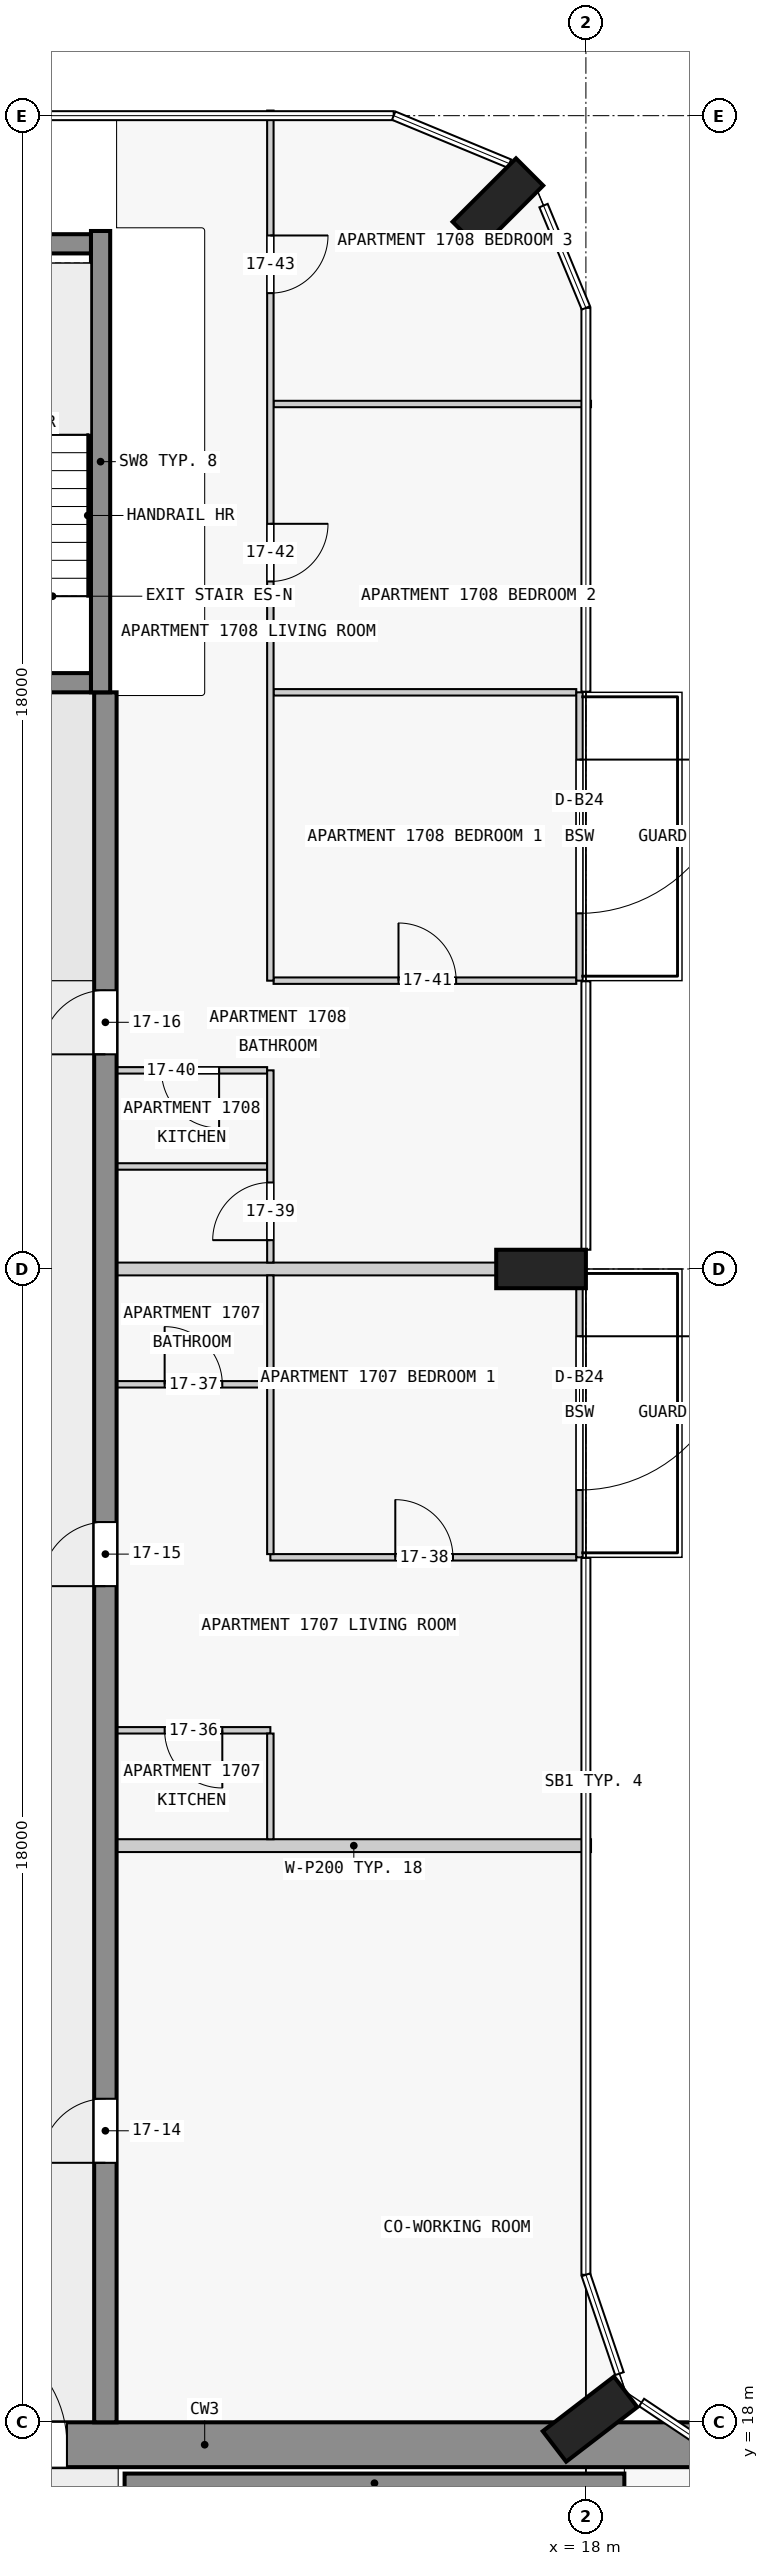
"""IFC4 building model, lengths in metres.
Left out: names, types, materials, properties, quantities, classifications, styles, units other than length and angle.
Written with IfcOpenShell. Run it as: python <this file> out.ifc"""

import sys

from ifc_helpers import new_model, si_unit, direction, frame, frame_2d, origin, origin_2d, place, context, subcontext, project, spatial, rectangle, extrude, element, fill, save


model = new_model("IFC4")
c1 = context("Model", 3, precision=1e-05, world=origin(), true_north=direction((0.0, 1.0)))
c2 = subcontext(c1, "Body", "Model", "MODEL_VIEW")
j1 = project(units=[si_unit("LENGTHUNIT", "METRE"), si_unit("PLANEANGLEUNIT", "RADIAN")], contexts=[c1])
p1 = place(None, origin())
s1 = spatial("IfcSite", under=j1, at=p1, CompositionType="ELEMENT")
p2 = place(p1, origin())
s2 = spatial("IfcBuilding", under=s1, at=p2, CompositionType="ELEMENT")
p3 = place(p2, frame((0.0, 0.0, 68.8)))
s3 = spatial("IfcBuildingStorey", under=s2, at=p3, CompositionType="ELEMENT", Elevation=68.8)
for number, where, z_axis, x_axis in (
    (1, (18.065, 18.05, 0.0), (0.0, 0.0, 1.0), (-0.609, 0.793, 0.0)),
    (2, (17.3, 36.0, 0.0), (0.0, 0.0, 1.0), (0.0, 1.0, 0.0)),
    (3, (16.626, 52.626, 0.0), (0.0, 0.0, 1.0), (-0.707, 0.707, 0.0)),
):
    element("IfcColumn", number, at=place(p3, frame(where, z_axis=z_axis, x_axis=x_axis)), inside=s3, PredefinedType="COLUMN", context=c2, shape_type="SweptSolid", body=[
        extrude(rectangle(XDim=0.6, YDim=1.4, at=origin_2d()), origin(), (0.0, 0.0, 1.0), 3.5),
    ])
p4 = place(p3, frame((1.6, 17.65, 0.0), z_axis=(0.0, 0.0, 1.0), x_axis=(1.0, 0.0, 0.0)))
e4 = element("IfcWall", 4, at=p4, inside=s3, PredefinedType="SHEAR", context=c2, shape_type="SweptSolid", body=[
    extrude(rectangle(XDim=20.9, YDim=0.7, at=frame_2d((10.45, 0.0))), origin(), (0.0, 0.0, 1.0), 3.2),
])
p5 = place(p4, frame((6.5, 0.0, 0.0)))
e5 = element("IfcOpeningElement", 5, at=p5, cuts=e4, PredefinedType="OPENING", context=c2, shape_type="SweptSolid", body=[
    extrude(rectangle(XDim=1.8, YDim=2.1, at=frame_2d((0.9, 1.05))), frame((0.0, 0.36, 0.0), z_axis=(0.0, -1.0, 0.0), x_axis=(1.0, 0.0, 0.0)), (0.0, 0.0, 1.0), 0.72),
])
p6 = place(p3, frame((10.8, 17.05, 0.0), z_axis=(0.0, 0.0, 1.0), x_axis=(1.0, 0.0, 0.0)))
e6 = element("IfcWall", 6, at=p6, inside=s3, PredefinedType="SHEAR", context=c2, shape_type="SweptSolid", body=[
    extrude(rectangle(XDim=7.8, YDim=0.3, at=frame_2d((3.9, 0.0))), origin(), (0.0, 0.0, 1.0), 3.2),
])
p7 = place(p3, frame((7.725, 45.15, 0.0), z_axis=(0.0, 0.0, 1.0), x_axis=(1.0, 0.0, 0.0)))
e7 = element("IfcWall", 7, at=p7, inside=s3, PredefinedType="SHEAR", context=c2, shape_type="SweptSolid", body=[
    extrude(rectangle(XDim=2.55, YDim=0.3, at=frame_2d((1.275, 0.0))), origin(), (0.0, 0.0, 1.0), 3.5),
])
p8 = place(p7, frame((0.725, 0.0, 0.0)))
e8 = element("IfcOpeningElement", 8, at=p8, cuts=e7, PredefinedType="OPENING", context=c2, shape_type="SweptSolid", body=[
    extrude(rectangle(XDim=1.1, YDim=2.1, at=frame_2d((0.55, 1.05))), frame((0.0, 0.16, 0.0), z_axis=(0.0, -1.0, 0.0), x_axis=(1.0, 0.0, 0.0)), (0.0, 0.0, 1.0), 0.32),
])
p9 = place(p3, frame((7.725, 52.0, 0.0), z_axis=(0.0, 0.0, 1.0), x_axis=(1.0, 0.0, 0.0)))
e9 = element("IfcWall", 9, at=p9, inside=s3, PredefinedType="SHEAR", context=c2, shape_type="SweptSolid", body=[
    extrude(rectangle(XDim=2.55, YDim=0.3, at=frame_2d((1.275, 0.0))), origin(), (0.0, 0.0, 1.0), 3.5),
])
p10 = place(p3, frame((10.425, 45.0, 0.0), z_axis=(0.0, 0.0, 1.0), x_axis=(0.0, 1.0, 0.0)))
e10 = element("IfcWall", 10, at=p10, inside=s3, PredefinedType="SHEAR", context=c2, shape_type="SweptSolid", body=[
    extrude(rectangle(XDim=7.2, YDim=0.3, at=frame_2d((3.6, 0.0))), origin(), (0.0, 0.0, 1.0), 3.5),
])
p11 = place(p3, frame((10.5, 18.0, 0.0), z_axis=(0.0, 0.0, 1.0), x_axis=(0.0, 1.0, 0.0)))
e11 = element("IfcWall", 11, at=p11, inside=s3, PredefinedType="SHEAR", context=c2, shape_type="SweptSolid", body=[
    extrude(rectangle(XDim=27.0, YDim=0.35, at=frame_2d((13.5, 0.0))), origin(), (0.0, 0.0, 1.0), 3.2),
])
p12 = place(p11, frame((4.05, 0.0, 0.0)))
e12 = element("IfcOpeningElement", 12, at=p12, cuts=e11, PredefinedType="OPENING", context=c2, shape_type="SweptSolid", body=[
    extrude(rectangle(XDim=1.0, YDim=2.1, at=frame_2d((0.5, 1.05))), frame((0.0, 0.185, 0.0), z_axis=(0.0, -1.0, 0.0), x_axis=(1.0, 0.0, 0.0)), (0.0, 0.0, 1.0), 0.37),
])
p13 = place(p11, frame((13.05, 0.0, 0.0)))
e13 = element("IfcOpeningElement", 13, at=p13, cuts=e11, PredefinedType="OPENING", context=c2, shape_type="SweptSolid", body=[
    extrude(rectangle(XDim=1.0, YDim=2.1, at=frame_2d((0.5, 1.05))), frame((0.0, 0.185, 0.0), z_axis=(0.0, -1.0, 0.0), x_axis=(1.0, 0.0, 0.0)), (0.0, 0.0, 1.0), 0.37),
])
p14 = place(p11, frame((21.35, 0.0, 0.0)))
e14 = element("IfcOpeningElement", 14, at=p14, cuts=e11, PredefinedType="OPENING", context=c2, shape_type="SweptSolid", body=[
    extrude(rectangle(XDim=1.0, YDim=2.1, at=frame_2d((0.5, 1.05))), frame((0.0, 0.185, 0.0), z_axis=(0.0, -1.0, 0.0), x_axis=(1.0, 0.0, 0.0)), (0.0, 0.0, 1.0), 0.37),
])
p15 = place(p3, frame((17.9, 36.0, 0.0), z_axis=(0.0, 0.0, 1.0), x_axis=(0.0, -1.0, 0.0)))
e15 = element("IfcWall", 15, at=p15, inside=s3, PredefinedType="STANDARD", context=c2, shape_type="SweptSolid", body=[
    extrude(rectangle(XDim=4.5, YDim=0.1, at=frame_2d((2.25, 0.0))), origin(), (0.0, 0.0, 1.0), 3.2),
])
p16 = place(p15, frame((1.05, 0.0, 0.0)))
e16 = element("IfcOpeningElement", 16, at=p16, cuts=e15, PredefinedType="OPENING", context=c2, shape_type="SweptSolid", body=[
    extrude(rectangle(XDim=2.4, YDim=2.4, at=frame_2d((1.2, 1.2))), frame((0.0, 0.06, 0.0), z_axis=(0.0, -1.0, 0.0), x_axis=(1.0, 0.0, 0.0)), (0.0, 0.0, 1.0), 0.12),
])
p17 = place(p3, frame((17.9, 45.0, 0.0), z_axis=(0.0, 0.0, 1.0), x_axis=(0.0, -1.0, 0.0)))
e17 = element("IfcWall", 17, at=p17, inside=s3, PredefinedType="STANDARD", context=c2, shape_type="SweptSolid", body=[
    extrude(rectangle(XDim=4.5, YDim=0.1, at=frame_2d((2.25, 0.0))), origin(), (0.0, 0.0, 1.0), 3.2),
])
p18 = place(p17, frame((1.05, 0.0, 0.0)))
e18 = element("IfcOpeningElement", 18, at=p18, cuts=e17, PredefinedType="OPENING", context=c2, shape_type="SweptSolid", body=[
    extrude(rectangle(XDim=2.4, YDim=2.4, at=frame_2d((1.2, 1.2))), frame((0.0, 0.06, 0.0), z_axis=(0.0, -1.0, 0.0), x_axis=(1.0, 0.0, 0.0)), (0.0, 0.0, 1.0), 0.12),
])
p19 = place(p3, frame((18.08, 27.0, 0.0), z_axis=(0.0, 0.0, 1.0), x_axis=(-1.0, 0.0, 0.0)))
e19 = element("IfcWall", 19, at=p19, inside=s3, PredefinedType="PARTITIONING", context=c2, shape_type="SweptSolid", body=[
    extrude(rectangle(XDim=7.405, YDim=0.2, at=frame_2d((3.703, 0.0))), origin(), (0.0, 0.0, 1.0), 3.2),
])
p20 = place(p3, frame((13.075, 28.8, 0.0), z_axis=(0.0, 0.0, 1.0), x_axis=(-1.0, 0.0, 0.0)))
e20 = element("IfcWall", 20, at=p20, inside=s3, PredefinedType="PARTITIONING", context=c2, shape_type="SweptSolid", body=[
    extrude(rectangle(XDim=2.4, YDim=0.1, at=frame_2d((1.2, 0.0))), origin(), (0.0, 0.0, 1.0), 3.2),
])
p21 = place(p20, frame((0.75, 0.0, 0.0)))
e21 = element("IfcOpeningElement", 21, at=p21, cuts=e20, PredefinedType="OPENING", context=c2, shape_type="SweptSolid", body=[
    extrude(rectangle(XDim=0.9, YDim=2.1, at=frame_2d((0.45, 1.05))), frame((0.0, 0.06, 0.0), z_axis=(0.0, -1.0, 0.0), x_axis=(1.0, 0.0, 0.0)), (0.0, 0.0, 1.0), 0.12),
])
p22 = place(p3, frame((13.075, 31.5, 0.0), z_axis=(0.0, 0.0, 1.0), x_axis=(1.0, 0.0, 0.0)))
e22 = element("IfcWall", 22, at=p22, inside=s3, PredefinedType="PARTITIONING", context=c2, shape_type="SweptSolid", body=[
    extrude(rectangle(XDim=4.775, YDim=0.1, at=frame_2d((2.388, 0.0))), origin(), (0.0, 0.0, 1.0), 3.2),
])
p23 = place(p22, frame((1.95, 0.0, 0.0)))
e23 = element("IfcOpeningElement", 23, at=p23, cuts=e22, PredefinedType="OPENING", context=c2, shape_type="SweptSolid", body=[
    extrude(rectangle(XDim=0.9, YDim=2.1, at=frame_2d((0.45, 1.05))), frame((0.0, 0.06, 0.0), z_axis=(0.0, -1.0, 0.0), x_axis=(1.0, 0.0, 0.0)), (0.0, 0.0, 1.0), 0.12),
])
p24 = place(p3, frame((10.675, 34.2, 0.0), z_axis=(0.0, 0.0, 1.0), x_axis=(1.0, 0.0, 0.0)))
e24 = element("IfcWall", 24, at=p24, inside=s3, PredefinedType="PARTITIONING", context=c2, shape_type="SweptSolid", body=[
    extrude(rectangle(XDim=2.35, YDim=0.1, at=frame_2d((1.175, 0.0))), origin(), (0.0, 0.0, 1.0), 3.2),
])
p25 = place(p24, frame((0.75, 0.0, 0.0)))
e25 = element("IfcOpeningElement", 25, at=p25, cuts=e24, PredefinedType="OPENING", context=c2, shape_type="SweptSolid", body=[
    extrude(rectangle(XDim=0.9, YDim=2.1, at=frame_2d((0.45, 1.05))), frame((0.0, 0.06, 0.0), z_axis=(0.0, -1.0, 0.0), x_axis=(1.0, 0.0, 0.0)), (0.0, 0.0, 1.0), 0.12),
])
p26 = place(p3, frame((16.6, 36.0, 0.0), z_axis=(0.0, 0.0, 1.0), x_axis=(-1.0, 0.0, 0.0)))
e26 = element("IfcWall", 26, at=p26, inside=s3, PredefinedType="PARTITIONING", context=c2, shape_type="SweptSolid", body=[
    extrude(rectangle(XDim=5.925, YDim=0.2, at=frame_2d((2.962, 0.0))), origin(), (0.0, 0.0, 1.0), 3.2),
])
p27 = place(p3, frame((13.025, 37.6, 0.0), z_axis=(0.0, 0.0, 1.0), x_axis=(-1.0, 0.0, 0.0)))
e27 = element("IfcWall", 27, at=p27, inside=s3, PredefinedType="PARTITIONING", context=c2, shape_type="SweptSolid", body=[
    extrude(rectangle(XDim=2.35, YDim=0.1, at=frame_2d((1.175, 0.0))), origin(), (0.0, 0.0, 1.0), 3.2),
])
p28 = place(p3, frame((13.025, 39.1, 0.0), z_axis=(0.0, 0.0, 1.0), x_axis=(-1.0, 0.0, 0.0)))
e28 = element("IfcWall", 28, at=p28, inside=s3, PredefinedType="PARTITIONING", context=c2, shape_type="SweptSolid", body=[
    extrude(rectangle(XDim=2.35, YDim=0.1, at=frame_2d((1.175, 0.0))), origin(), (0.0, 0.0, 1.0), 3.2),
])
p29 = place(p28, frame((0.75, 0.0, 0.0)))
e29 = element("IfcOpeningElement", 29, at=p29, cuts=e28, PredefinedType="OPENING", context=c2, shape_type="SweptSolid", body=[
    extrude(rectangle(XDim=0.9, YDim=2.1, at=frame_2d((0.45, 1.05))), frame((0.0, 0.06, 0.0), z_axis=(0.0, -1.0, 0.0), x_axis=(1.0, 0.0, 0.0)), (0.0, 0.0, 1.0), 0.12),
])
p30 = place(p3, frame((13.125, 40.5, 0.0), z_axis=(0.0, 0.0, 1.0), x_axis=(1.0, 0.0, 0.0)))
e30 = element("IfcWall", 30, at=p30, inside=s3, PredefinedType="PARTITIONING", context=c2, shape_type="SweptSolid", body=[
    extrude(rectangle(XDim=4.725, YDim=0.1, at=frame_2d((2.363, 0.0))), origin(), (0.0, 0.0, 1.0), 3.2),
])
p31 = place(p30, frame((1.95, 0.0, 0.0)))
e31 = element("IfcOpeningElement", 31, at=p31, cuts=e30, PredefinedType="OPENING", context=c2, shape_type="SweptSolid", body=[
    extrude(rectangle(XDim=0.9, YDim=2.1, at=frame_2d((0.45, 1.05))), frame((0.0, 0.06, 0.0), z_axis=(0.0, -1.0, 0.0), x_axis=(1.0, 0.0, 0.0)), (0.0, 0.0, 1.0), 0.12),
])
p32 = place(p3, frame((17.85, 45.0, 0.0), z_axis=(0.0, 0.0, 1.0), x_axis=(-1.0, 0.0, 0.0)))
e32 = element("IfcWall", 32, at=p32, inside=s3, PredefinedType="PARTITIONING", context=c2, shape_type="SweptSolid", body=[
    extrude(rectangle(XDim=4.725, YDim=0.1, at=frame_2d((2.363, 0.0))), origin(), (0.0, 0.0, 1.0), 3.2),
])
p33 = place(p3, frame((18.08, 49.5, 0.0), z_axis=(0.0, 0.0, 1.0), x_axis=(-1.0, 0.0, 0.0)))
e33 = element("IfcWall", 33, at=p33, inside=s3, PredefinedType="PARTITIONING", context=c2, shape_type="SweptSolid", body=[
    extrude(rectangle(XDim=4.955, YDim=0.1, at=frame_2d((2.478, 0.0))), origin(), (0.0, 0.0, 1.0), 3.2),
])
p34 = place(p3, frame((13.075, 34.15, 0.0), z_axis=(0.0, 0.0, 1.0), x_axis=(0.0, -1.0, 0.0)))
e34 = element("IfcWall", 34, at=p34, inside=s3, PredefinedType="PARTITIONING", context=c2, shape_type="SweptSolid", body=[
    extrude(rectangle(XDim=2.6, YDim=0.1, at=frame_2d((1.3, 0.0))), origin(), (0.0, 0.0, 1.0), 3.2),
])
p35 = place(p3, frame((13.075, 54.08, 0.0), z_axis=(0.0, 0.0, 1.0), x_axis=(0.0, -1.0, 0.0)))
e35 = element("IfcWall", 35, at=p35, inside=s3, PredefinedType="PARTITIONING", context=c2, shape_type="SweptSolid", body=[
    extrude(rectangle(XDim=13.58, YDim=0.1, at=frame_2d((6.79, 0.0))), origin(), (0.0, 0.0, 1.0), 3.2),
])
p36 = place(p35, frame((6.45, 0.0, 0.0)))
e36 = element("IfcOpeningElement", 36, at=p36, cuts=e35, PredefinedType="OPENING", context=c2, shape_type="SweptSolid", body=[
    extrude(rectangle(XDim=0.9, YDim=2.1, at=frame_2d((0.45, 1.05))), frame((0.0, 0.06, 0.0), z_axis=(0.0, -1.0, 0.0), x_axis=(1.0, 0.0, 0.0)), (0.0, 0.0, 1.0), 0.12),
])
p37 = place(p35, frame((1.95, 0.0, 0.0)))
e37 = element("IfcOpeningElement", 37, at=p37, cuts=e35, PredefinedType="OPENING", context=c2, shape_type="SweptSolid", body=[
    extrude(rectangle(XDim=0.9, YDim=2.1, at=frame_2d((0.45, 1.05))), frame((0.0, 0.06, 0.0), z_axis=(0.0, -1.0, 0.0), x_axis=(1.0, 0.0, 0.0)), (0.0, 0.0, 1.0), 0.12),
])
p38 = place(p3, frame((13.075, 27.1, 0.0), z_axis=(0.0, 0.0, 1.0), x_axis=(0.0, 1.0, 0.0)))
e38 = element("IfcWall", 38, at=p38, inside=s3, PredefinedType="PARTITIONING", context=c2, shape_type="SweptSolid", body=[
    extrude(rectangle(XDim=1.65, YDim=0.1, at=frame_2d((0.825, 0.0))), origin(), (0.0, 0.0, 1.0), 3.2),
])
p39 = place(p3, frame((13.075, 34.2, 0.0), z_axis=(0.0, 0.0, 1.0), x_axis=(0.0, 1.0, 0.0)))
e39 = element("IfcWall", 39, at=p39, inside=s3, PredefinedType="PARTITIONING", context=c2, shape_type="SweptSolid", body=[
    extrude(rectangle(XDim=1.7, YDim=0.1, at=frame_2d((0.85, 0.0))), origin(), (0.0, 0.0, 1.0), 3.2),
])
p40 = place(p3, frame((13.075, 36.1, 0.0), z_axis=(0.0, 0.0, 1.0), x_axis=(0.0, 1.0, 0.0)))
e40 = element("IfcWall", 40, at=p40, inside=s3, PredefinedType="PARTITIONING", context=c2, shape_type="SweptSolid", body=[
    extrude(rectangle(XDim=3.0, YDim=0.1, at=frame_2d((1.5, 0.0))), origin(), (0.0, 0.0, 1.0), 3.2),
])
p41 = place(p40, frame((0.35, 0.0, 0.0)))
e41 = element("IfcOpeningElement", 41, at=p41, cuts=e40, PredefinedType="OPENING", context=c2, shape_type="SweptSolid", body=[
    extrude(rectangle(XDim=0.9, YDim=2.1, at=frame_2d((0.45, 1.05))), frame((0.0, 0.06, 0.0), z_axis=(0.0, -1.0, 0.0), x_axis=(1.0, 0.0, 0.0)), (0.0, 0.0, 1.0), 0.12),
])
p42 = place(p16, origin())
e42 = element("IfcDoor", 42, at=p42, inside=s3, OperationType="SINGLE_SWING_LEFT", PredefinedType="DOOR", context=c2, shape_type="SweptSolid", body=[
    extrude(rectangle(XDim=2.4, YDim=2.4, at=frame_2d((1.2, 1.2))), frame((0.0, 0.025, 0.0), z_axis=(0.0, -1.0, 0.0), x_axis=(1.0, 0.0, 0.0)), (0.0, 0.0, 1.0), 0.05),
])
fill(e16, e42)
p43 = place(p18, origin())
e43 = element("IfcDoor", 43, at=p43, inside=s3, OperationType="SINGLE_SWING_LEFT", PredefinedType="DOOR", context=c2, shape_type="SweptSolid", body=[
    extrude(rectangle(XDim=2.4, YDim=2.4, at=frame_2d((1.2, 1.2))), frame((0.0, 0.025, 0.0), z_axis=(0.0, -1.0, 0.0), x_axis=(1.0, 0.0, 0.0)), (0.0, 0.0, 1.0), 0.05),
])
fill(e18, e43)
p44 = place(p5, origin())
e44 = element("IfcDoor", 44, at=p44, inside=s3, OperationType="DOUBLE_DOOR_SINGLE_SWING", PredefinedType="DOOR", context=c2, shape_type="SweptSolid", body=[
    extrude(rectangle(XDim=1.8, YDim=2.1, at=frame_2d((0.9, 1.05))), frame((0.0, 0.025, 0.0), z_axis=(0.0, -1.0, 0.0), x_axis=(1.0, 0.0, 0.0)), (0.0, 0.0, 1.0), 0.05),
])
fill(e5, e44)
p45 = place(p12, origin())
e45 = element("IfcDoor", 45, at=p45, inside=s3, OperationType="SINGLE_SWING_LEFT", PredefinedType="DOOR", context=c2, shape_type="SweptSolid", body=[
    extrude(rectangle(XDim=1.0, YDim=2.1, at=frame_2d((0.5, 1.05))), frame((0.0, 0.025, 0.0), z_axis=(0.0, -1.0, 0.0), x_axis=(1.0, 0.0, 0.0)), (0.0, 0.0, 1.0), 0.05),
])
fill(e12, e45)
p46 = place(p13, origin())
e46 = element("IfcDoor", 46, at=p46, inside=s3, OperationType="SINGLE_SWING_RIGHT", PredefinedType="DOOR", context=c2, shape_type="SweptSolid", body=[
    extrude(rectangle(XDim=1.0, YDim=2.1, at=frame_2d((0.5, 1.05))), frame((0.0, 0.025, 0.0), z_axis=(0.0, -1.0, 0.0), x_axis=(1.0, 0.0, 0.0)), (0.0, 0.0, 1.0), 0.05),
])
fill(e13, e46)
p47 = place(p14, origin())
e47 = element("IfcDoor", 47, at=p47, inside=s3, OperationType="SINGLE_SWING_RIGHT", PredefinedType="DOOR", context=c2, shape_type="SweptSolid", body=[
    extrude(rectangle(XDim=1.0, YDim=2.1, at=frame_2d((0.5, 1.05))), frame((0.0, 0.025, 0.0), z_axis=(0.0, -1.0, 0.0), x_axis=(1.0, 0.0, 0.0)), (0.0, 0.0, 1.0), 0.05),
])
fill(e14, e47)
p48 = place(p21, origin())
e48 = element("IfcDoor", 48, at=p48, inside=s3, OperationType="SINGLE_SWING_RIGHT", PredefinedType="DOOR", context=c2, shape_type="SweptSolid", body=[
    extrude(rectangle(XDim=0.9, YDim=2.1, at=frame_2d((0.45, 1.05))), frame((0.0, 0.025, 0.0), z_axis=(0.0, -1.0, 0.0), x_axis=(1.0, 0.0, 0.0)), (0.0, 0.0, 1.0), 0.05),
])
fill(e21, e48)
p49 = place(p25, origin())
e49 = element("IfcDoor", 49, at=p49, inside=s3, OperationType="SINGLE_SWING_RIGHT", PredefinedType="DOOR", context=c2, shape_type="SweptSolid", body=[
    extrude(rectangle(XDim=0.9, YDim=2.1, at=frame_2d((0.45, 1.05))), frame((0.0, 0.025, 0.0), z_axis=(0.0, -1.0, 0.0), x_axis=(1.0, 0.0, 0.0)), (0.0, 0.0, 1.0), 0.05),
])
fill(e25, e49)
p50 = place(p23, origin())
e50 = element("IfcDoor", 50, at=p50, inside=s3, OperationType="SINGLE_SWING_RIGHT", PredefinedType="DOOR", context=c2, shape_type="SweptSolid", body=[
    extrude(rectangle(XDim=0.9, YDim=2.1, at=frame_2d((0.45, 1.05))), frame((0.0, 0.025, 0.0), z_axis=(0.0, -1.0, 0.0), x_axis=(1.0, 0.0, 0.0)), (0.0, 0.0, 1.0), 0.05),
])
fill(e23, e50)
p51 = place(p41, origin())
e51 = element("IfcDoor", 51, at=p51, inside=s3, OperationType="SINGLE_SWING_LEFT", PredefinedType="DOOR", context=c2, shape_type="SweptSolid", body=[
    extrude(rectangle(XDim=0.9, YDim=2.1, at=frame_2d((0.45, 1.05))), frame((0.0, 0.025, 0.0), z_axis=(0.0, -1.0, 0.0), x_axis=(1.0, 0.0, 0.0)), (0.0, 0.0, 1.0), 0.05),
])
fill(e41, e51)
p52 = place(p29, origin())
e52 = element("IfcDoor", 52, at=p52, inside=s3, OperationType="SINGLE_SWING_RIGHT", PredefinedType="DOOR", context=c2, shape_type="SweptSolid", body=[
    extrude(rectangle(XDim=0.9, YDim=2.1, at=frame_2d((0.45, 1.05))), frame((0.0, 0.025, 0.0), z_axis=(0.0, -1.0, 0.0), x_axis=(1.0, 0.0, 0.0)), (0.0, 0.0, 1.0), 0.05),
])
fill(e29, e52)
p53 = place(p31, origin())
e53 = element("IfcDoor", 53, at=p53, inside=s3, OperationType="SINGLE_SWING_RIGHT", PredefinedType="DOOR", context=c2, shape_type="SweptSolid", body=[
    extrude(rectangle(XDim=0.9, YDim=2.1, at=frame_2d((0.45, 1.05))), frame((0.0, 0.025, 0.0), z_axis=(0.0, -1.0, 0.0), x_axis=(1.0, 0.0, 0.0)), (0.0, 0.0, 1.0), 0.05),
])
fill(e31, e53)
p54 = place(p36, origin())
e54 = element("IfcDoor", 54, at=p54, inside=s3, OperationType="SINGLE_SWING_RIGHT", PredefinedType="DOOR", context=c2, shape_type="SweptSolid", body=[
    extrude(rectangle(XDim=0.9, YDim=2.1, at=frame_2d((0.45, 1.05))), frame((0.0, 0.025, 0.0), z_axis=(0.0, -1.0, 0.0), x_axis=(1.0, 0.0, 0.0)), (0.0, 0.0, 1.0), 0.05),
])
fill(e36, e54)
p55 = place(p37, origin())
e55 = element("IfcDoor", 55, at=p55, inside=s3, OperationType="SINGLE_SWING_LEFT", PredefinedType="DOOR", context=c2, shape_type="SweptSolid", body=[
    extrude(rectangle(XDim=0.9, YDim=2.1, at=frame_2d((0.45, 1.05))), frame((0.0, 0.025, 0.0), z_axis=(0.0, -1.0, 0.0), x_axis=(1.0, 0.0, 0.0)), (0.0, 0.0, 1.0), 0.05),
])
fill(e37, e55)
save(model, sys.argv[1])
